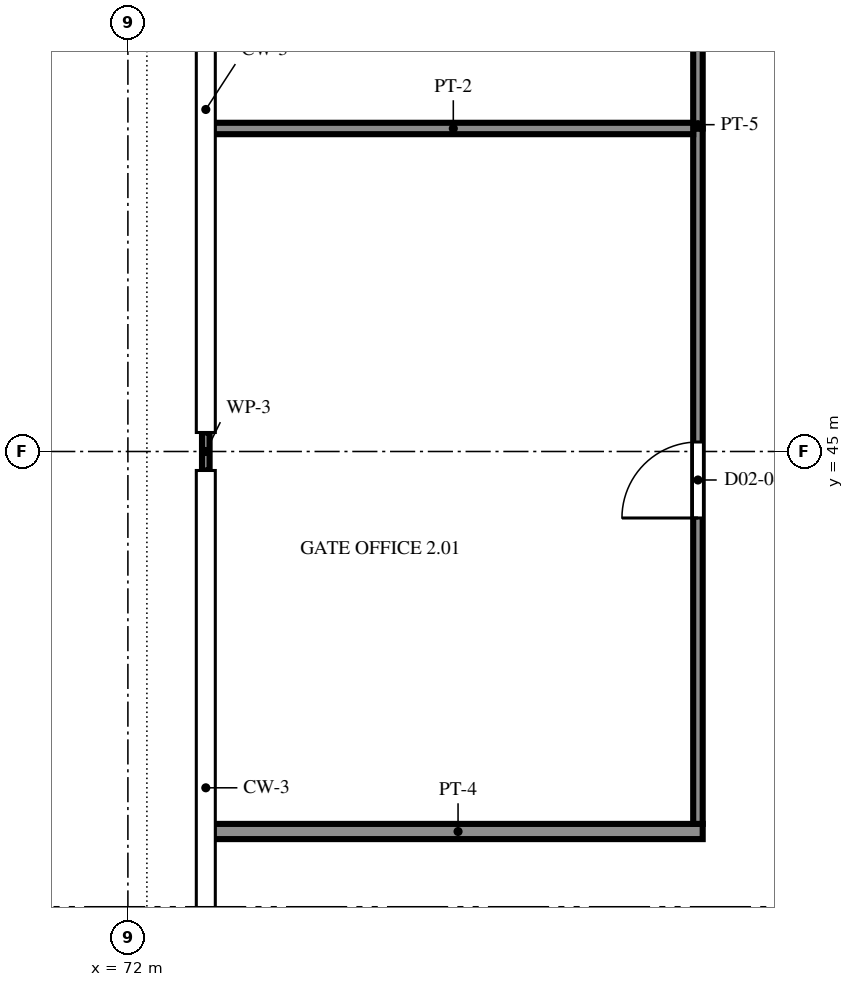
"""IFC4 building model, lengths in metres.
Left out: names, types, materials, properties, quantities, classifications, styles, units other than length and angle.
Written with IfcOpenShell. Run it as: python <this file> out.ifc"""

import sys

from ifc_helpers import new_model, si_unit, direction, frame, frame_2d, origin, place, context, subcontext, project, spatial, polyline, rectangle, outline, extrude, element, fill, save


model = new_model("IFC4")
c1 = context("Model", 3, precision=1e-05, world=origin(), true_north=direction((0.0, 1.0)))
c2 = subcontext(c1, "Body", "Model", "MODEL_VIEW")
j1 = project(units=[si_unit("LENGTHUNIT", "METRE"), si_unit("PLANEANGLEUNIT", "RADIAN")], contexts=[c1])
p1 = place(None, origin())
s1 = spatial("IfcSite", under=j1, at=p1, CompositionType="ELEMENT")
p2 = place(p1, origin())
s2 = spatial("IfcBuilding", under=s1, at=p2, CompositionType="ELEMENT")
p3 = place(p2, frame((0.0, 0.0, 11.7)))
s3 = spatial("IfcBuildingStorey", under=s2, at=p3, CompositionType="ELEMENT", Elevation=11.7)
p4 = place(p3, frame((73.025, 44.75, 0.0), z_axis=(0.0, 0.0, 1.0), x_axis=(0.0, 1.0, 0.0)))
e1 = element("IfcWall", 1, at=p4, inside=s3, PredefinedType="SOLIDWALL", context=c2, shape_type="SweptSolid", body=[
    extrude(rectangle(XDim=0.5, YDim=0.1, at=frame_2d((0.25, 0.0))), origin(), (0.0, 0.0, 1.0), 3.288),
])
p5 = place(p3, frame((73.125, 40.0, 0.0), z_axis=(0.0, 0.0, 1.0), x_axis=(1.0, 0.0, 0.0)))
e2 = element("IfcWall", 2, at=p5, inside=s3, PredefinedType="PARTITIONING", context=c2, shape_type="SweptSolid", body=[
    extrude(rectangle(XDim=6.438, YDim=0.2, at=frame_2d((3.219, 0.0))), origin(), (0.0, 0.0, 1.0), 3.382),
])
p6 = place(p3, frame((79.5, 40.1, 0.0), z_axis=(0.0, 0.0, 1.0), x_axis=(0.0, 1.0, 0.0)))
e3 = element("IfcWall", 3, at=p6, inside=s3, PredefinedType="PARTITIONING", context=c2, shape_type="SweptSolid", body=[
    extrude(rectangle(XDim=9.15, YDim=0.125, at=frame_2d((4.575, 0.0))), origin(), (0.0, 0.0, 1.0), 3.287),
])
p7 = place(p6, frame((4.025, 0.0, 0.0)))
e4 = element("IfcOpeningElement", 4, at=p7, cuts=e3, PredefinedType="OPENING", context=c2, shape_type="SweptSolid", body=[
    extrude(rectangle(XDim=1.0, YDim=2.1, at=frame_2d((0.5, 1.05))), frame((0.0, 0.073, 0.0), z_axis=(0.0, -1.0, 0.0), x_axis=(1.0, 0.0, 0.0)), (0.0, 0.0, 1.0), 0.145),
])
p8 = place(p3, frame((79.5, 49.25, 0.0), z_axis=(0.0, 0.0, 1.0), x_axis=(0.0, 1.0, 0.0)))
e5 = element("IfcWall", 5, at=p8, inside=s3, PredefinedType="PARTITIONING", context=c2, shape_type="SweptSolid", body=[
    extrude(rectangle(XDim=9.25, YDim=0.125, at=frame_2d((4.625, 0.0))), origin(), (0.0, 0.0, 1.0), 3.287),
])
p9 = place(p8, frame((4.125, 0.0, 0.0)))
e6 = element("IfcOpeningElement", 6, at=p9, cuts=e5, PredefinedType="OPENING", context=c2, shape_type="SweptSolid", body=[
    extrude(rectangle(XDim=1.0, YDim=2.1, at=frame_2d((0.5, 1.05))), frame((0.0, 0.073, 0.0), z_axis=(0.0, -1.0, 0.0), x_axis=(1.0, 0.0, 0.0)), (0.0, 0.0, 1.0), 0.145),
])
p10 = place(p3, frame((73.125, 49.25, 0.0), z_axis=(0.0, 0.0, 1.0), x_axis=(1.0, 0.0, 0.0)))
e7 = element("IfcWall", 7, at=p10, inside=s3, PredefinedType="PARTITIONING", context=c2, shape_type="SweptSolid", body=[
    extrude(rectangle(XDim=6.312, YDim=0.15, at=frame_2d((3.156, 0.0))), origin(), (0.0, 0.0, 1.0), 3.307),
])
p11 = place(p7, origin())
e8 = element("IfcDoor", 8, at=p11, inside=s3, OperationType="SINGLE_SWING_LEFT", PredefinedType="DOOR", context=c2, shape_type="SweptSolid", body=[
    extrude(outline(polyline([(0.0, 0.0), (0.07, 0.0), (0.07, 2.03), (0.93, 2.03), (0.93, 0.0), (1.0, 0.0), (1.0, 2.1), (0.0, 2.1), (0.0, 0.0)])), frame((0.0, 0.025, 0.0), z_axis=(0.0, -1.0, 0.0), x_axis=(1.0, 0.0, 0.0)), (0.0, 0.0, 1.0), 0.05),
    extrude(outline(polyline([(0.074, 0.01), (0.926, 0.01), (0.926, 2.026), (0.074, 2.026), (0.074, 0.01)]), holes=[polyline([(0.194, 0.16), (0.806, 0.16), (0.806, 1.01), (0.194, 1.01), (0.194, 0.16)]), polyline([(0.35, 1.16), (0.65, 1.16), (0.65, 1.76), (0.35, 1.76), (0.35, 1.16)])]), frame((0.0, 0.017, 0.0), z_axis=(0.0, -1.0, 0.0), x_axis=(1.0, 0.0, 0.0)), (0.0, 0.0, 1.0), 0.035),
    extrude(rectangle(XDim=0.612, YDim=0.85, at=frame_2d((0.5, 0.585))), frame((0.0, 0.009, 0.0), z_axis=(0.0, -1.0, 0.0), x_axis=(1.0, 0.0, 0.0)), (0.0, 0.0, 1.0), 0.017),
    extrude(rectangle(XDim=0.3, YDim=0.6, at=frame_2d((0.5, 1.46))), frame((0.0, 0.006, 0.0), z_axis=(0.0, -1.0, 0.0), x_axis=(1.0, 0.0, 0.0)), (0.0, 0.0, 1.0), 0.012),
])
fill(e4, e8)
save(model, sys.argv[1])
